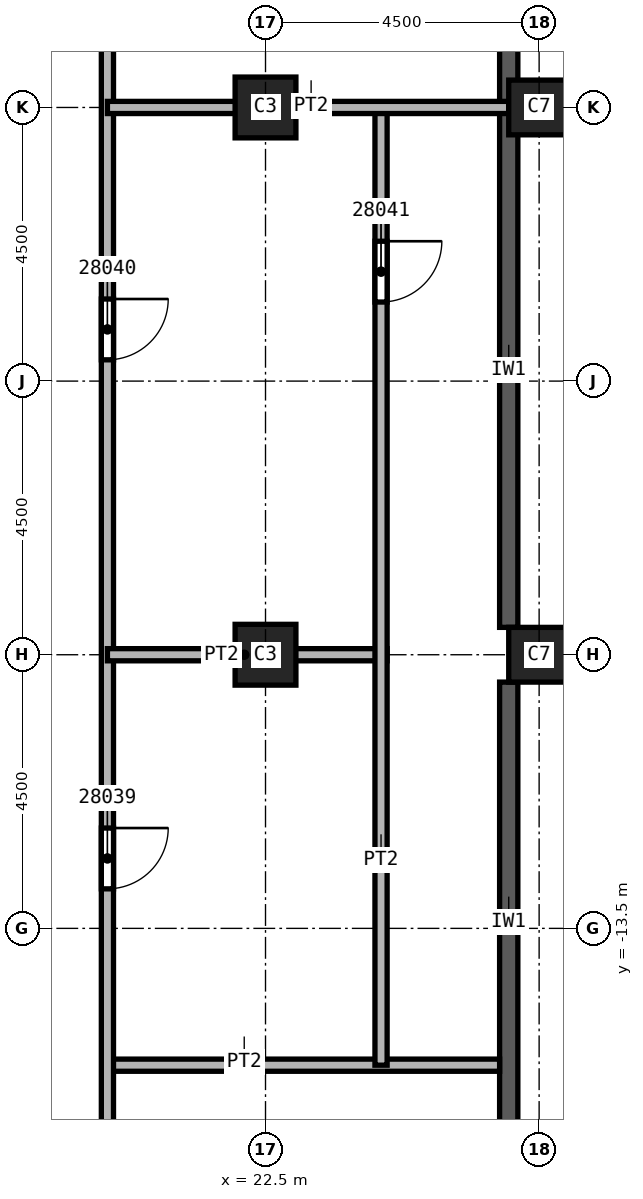
"""IFC4 building model, lengths in metres.
Left out: names, types, materials, properties, quantities, classifications, styles, units other than length and angle.
Written with IfcOpenShell. Run it as: python <this file> out.ifc"""

import sys

from ifc_helpers import new_model, si_unit, direction, frame, frame_2d, origin, origin_2d, place, context, subcontext, project, spatial, rectangle, extrude, element, fill, save


model = new_model("IFC4")
c1 = context("Model", 3, precision=1e-05, world=origin(), true_north=direction((0.0, 1.0)))
c2 = subcontext(c1, "Body", "Model", "MODEL_VIEW")
j1 = project(units=[si_unit("LENGTHUNIT", "METRE"), si_unit("PLANEANGLEUNIT", "RADIAN")], contexts=[c1])
p1 = place(None, origin())
s1 = spatial("IfcSite", under=j1, at=p1, CompositionType="ELEMENT")
p2 = place(p1, origin())
s2 = spatial("IfcBuilding", under=s1, at=p2, CompositionType="ELEMENT")
p3 = place(p2, frame((0.0, 0.0, 236.0)))
s3 = spatial("IfcBuildingStorey", under=s2, at=p3, CompositionType="ELEMENT", Elevation=236.0)
for number, where, z_axis, x_axis in (
    (1, (22.5, 0.0, 0.0), (0.0, 0.0, 1.0), (1.0, 0.0, 0.0)),
    (2, (22.5, -9.0, 0.0), (0.0, 0.0, 1.0), (1.0, 0.0, 0.0)),
):
    element("IfcColumn", number, at=place(p3, frame(where, z_axis=z_axis, x_axis=x_axis)), inside=s3, PredefinedType="COLUMN", context=c2, shape_type="SweptSolid", body=[
        extrude(rectangle(XDim=1.0, YDim=1.0, at=origin_2d()), origin(), (0.0, 0.0, 1.0), 5.72),
    ])
for number, where, z_axis, x_axis in (
    (3, (27.0, 0.0, 0.0), (0.0, 0.0, 1.0), (0.0, 1.0, 0.0)),
    (4, (27.0, -9.0, 0.0), (0.0, 0.0, 1.0), (0.0, 1.0, 0.0)),
):
    element("IfcColumn", number, at=place(p3, frame(where, z_axis=z_axis, x_axis=x_axis)), inside=s3, PredefinedType="COLUMN", context=c2, shape_type="SweptSolid", body=[
        extrude(rectangle(XDim=0.9, YDim=1.0, at=origin_2d()), origin(), (0.0, 0.0, 1.0), 5.72),
    ])
p4 = place(p3, frame((26.5, -17.61, 0.0), z_axis=(0.0, 0.0, 1.0), x_axis=(0.0, 1.0, 0.0)))
e5 = element("IfcWall", 5, at=p4, inside=s3, PredefinedType="SOLIDWALL", context=c2, shape_type="SweptSolid", body=[
    extrude(rectangle(XDim=8.16, YDim=0.3, at=frame_2d((4.08, 0.0))), origin(), (0.0, 0.0, 1.0), 5.12),
])
p5 = place(p3, frame((26.5, -8.55, 0.0), z_axis=(0.0, 0.0, 1.0), x_axis=(0.0, 1.0, 0.0)))
e6 = element("IfcWall", 6, at=p5, inside=s3, PredefinedType="SOLIDWALL", context=c2, shape_type="SweptSolid", body=[
    extrude(rectangle(XDim=8.5, YDim=0.3, at=frame_2d((4.25, 0.0))), origin(), (0.0, 0.0, 1.0), 5.12),
])
p6 = place(p3, frame((26.5, 0.05, 0.0), z_axis=(0.0, 0.0, 1.0), x_axis=(0.0, 1.0, 0.0)))
e7 = element("IfcWall", 7, at=p6, inside=s3, PredefinedType="SOLIDWALL", context=c2, shape_type="SweptSolid", body=[
    extrude(rectangle(XDim=8.9, YDim=0.3, at=frame_2d((4.45, 0.0))), origin(), (0.0, 0.0, 1.0), 5.12),
])
p7 = place(p3, frame((19.9, -15.75, 0.0), z_axis=(0.0, 0.0, 1.0), x_axis=(1.0, 0.0, 0.0)))
e8 = element("IfcWall", 8, at=p7, inside=s3, PredefinedType="PARTITIONING", context=c2, shape_type="SweptSolid", body=[
    extrude(rectangle(XDim=6.45, YDim=0.2, at=frame_2d((3.225, 0.0))), origin(), (0.0, 0.0, 1.0), 5.72),
])
p8 = place(p3, frame((19.9, 22.15, 0.0), z_axis=(0.0, 0.0, 1.0), x_axis=(0.0, -1.0, 0.0)))
e9 = element("IfcWall", 9, at=p8, inside=s3, PredefinedType="PARTITIONING", context=c2, shape_type="SweptSolid", body=[
    extrude(rectangle(XDim=44.3, YDim=0.2, at=frame_2d((22.15, 0.0))), origin(), (0.0, 0.0, 1.0), 5.72),
])
p9 = place(p8, frame((14.5, 0.0, 0.0)))
e10 = element("IfcOpeningElement", 10, at=p9, cuts=e9, PredefinedType="OPENING", context=c2, shape_type="SweptSolid", body=[
    extrude(rectangle(XDim=1.0, YDim=2.1, at=frame_2d((0.5, 1.05))), frame((0.0, 0.1, 0.0), z_axis=(0.0, -1.0, 0.0), x_axis=(1.0, 0.0, 0.0)), (0.0, 0.0, 1.0), 0.2),
])
p10 = place(p8, frame((11.95, 0.0, 0.0)))
e11 = element("IfcOpeningElement", 11, at=p10, cuts=e9, PredefinedType="OPENING", context=c2, shape_type="SweptSolid", body=[
    extrude(rectangle(XDim=1.0, YDim=2.1, at=frame_2d((0.5, 1.05))), frame((0.0, 0.1, 0.0), z_axis=(0.0, -1.0, 0.0), x_axis=(1.0, 0.0, 0.0)), (0.0, 0.0, 1.0), 0.2),
])
p11 = place(p8, frame((4.6, 0.0, 0.0)))
e12 = element("IfcOpeningElement", 12, at=p11, cuts=e9, PredefinedType="OPENING", context=c2, shape_type="SweptSolid", body=[
    extrude(rectangle(XDim=1.0, YDim=2.1, at=frame_2d((0.5, 1.05))), frame((0.0, 0.1, 0.0), z_axis=(0.0, -1.0, 0.0), x_axis=(1.0, 0.0, 0.0)), (0.0, 0.0, 1.0), 0.2),
])
p12 = place(p8, frame((41.5, 0.0, 0.0)))
e13 = element("IfcOpeningElement", 13, at=p12, cuts=e9, PredefinedType="OPENING", context=c2, shape_type="SweptSolid", body=[
    extrude(rectangle(XDim=1.0, YDim=2.1, at=frame_2d((0.5, 1.05))), frame((0.0, 0.1, 0.0), z_axis=(0.0, -1.0, 0.0), x_axis=(1.0, 0.0, 0.0)), (0.0, 0.0, 1.0), 0.2),
])
p13 = place(p8, frame((34.0, 0.0, 0.0)))
e14 = element("IfcOpeningElement", 14, at=p13, cuts=e9, PredefinedType="OPENING", context=c2, shape_type="SweptSolid", body=[
    extrude(rectangle(XDim=1.0, YDim=2.1, at=frame_2d((0.5, 1.05))), frame((0.0, 0.1, 0.0), z_axis=(0.0, -1.0, 0.0), x_axis=(1.0, 0.0, 0.0)), (0.0, 0.0, 1.0), 0.2),
])
p14 = place(p8, frame((25.3, 0.0, 0.0)))
e15 = element("IfcOpeningElement", 15, at=p14, cuts=e9, PredefinedType="OPENING", context=c2, shape_type="SweptSolid", body=[
    extrude(rectangle(XDim=1.0, YDim=2.1, at=frame_2d((0.5, 1.05))), frame((0.0, 0.1, 0.0), z_axis=(0.0, -1.0, 0.0), x_axis=(1.0, 0.0, 0.0)), (0.0, 0.0, 1.0), 0.2),
])
p15 = place(p3, frame((19.9, -9.0, 0.0), z_axis=(0.0, 0.0, 1.0), x_axis=(1.0, 0.0, 0.0)))
e16 = element("IfcWall", 16, at=p15, inside=s3, PredefinedType="PARTITIONING", context=c2, shape_type="SweptSolid", body=[
    extrude(rectangle(XDim=4.6, YDim=0.2, at=frame_2d((2.3, 0.0))), origin(), (0.0, 0.0, 1.0), 5.72),
])
p16 = place(p3, frame((24.4, 0.0, 0.0), z_axis=(0.0, 0.0, 1.0), x_axis=(0.0, -1.0, 0.0)))
e17 = element("IfcWall", 17, at=p16, inside=s3, PredefinedType="PARTITIONING", context=c2, shape_type="SweptSolid", body=[
    extrude(rectangle(XDim=15.75, YDim=0.2, at=frame_2d((7.875, 0.0))), origin(), (0.0, 0.0, 1.0), 5.72),
])
p17 = place(p16, frame((2.2, 0.0, 0.0)))
e18 = element("IfcOpeningElement", 18, at=p17, cuts=e17, PredefinedType="OPENING", context=c2, shape_type="SweptSolid", body=[
    extrude(rectangle(XDim=1.0, YDim=2.1, at=frame_2d((0.5, 1.05))), frame((0.0, 0.1, 0.0), z_axis=(0.0, -1.0, 0.0), x_axis=(1.0, 0.0, 0.0)), (0.0, 0.0, 1.0), 0.2),
])
p18 = place(p3, frame((26.5, 0.0, 0.0), z_axis=(0.0, 0.0, 1.0), x_axis=(-1.0, 0.0, 0.0)))
e19 = element("IfcWall", 19, at=p18, inside=s3, PredefinedType="PARTITIONING", context=c2, shape_type="SweptSolid", body=[
    extrude(rectangle(XDim=6.6, YDim=0.2, at=frame_2d((3.3, 0.0))), origin(), (0.0, 0.0, 1.0), 5.72),
])
p19 = place(p13, origin())
e20 = element("IfcDoor", 20, at=p19, inside=s3, OperationType="SINGLE_SWING_RIGHT", PredefinedType="DOOR", context=c2, shape_type="SweptSolid", body=[
    extrude(rectangle(XDim=1.0, YDim=2.1, at=frame_2d((0.5, 1.05))), frame((0.0, 0.025, 0.0), z_axis=(0.0, -1.0, 0.0), x_axis=(1.0, 0.0, 0.0)), (0.0, 0.0, 1.0), 0.05),
])
fill(e14, e20)
p20 = place(p14, origin())
e21 = element("IfcDoor", 21, at=p20, inside=s3, OperationType="SINGLE_SWING_LEFT", PredefinedType="DOOR", context=c2, shape_type="SweptSolid", body=[
    extrude(rectangle(XDim=1.0, YDim=2.1, at=frame_2d((0.5, 1.05))), frame((0.0, 0.025, 0.0), z_axis=(0.0, -1.0, 0.0), x_axis=(1.0, 0.0, 0.0)), (0.0, 0.0, 1.0), 0.05),
])
fill(e15, e21)
p21 = place(p17, origin())
e22 = element("IfcDoor", 22, at=p21, inside=s3, OperationType="SINGLE_SWING_RIGHT", PredefinedType="DOOR", context=c2, shape_type="SweptSolid", body=[
    extrude(rectangle(XDim=1.0, YDim=2.1, at=frame_2d((0.5, 1.05))), frame((0.0, 0.025, 0.0), z_axis=(0.0, -1.0, 0.0), x_axis=(1.0, 0.0, 0.0)), (0.0, 0.0, 1.0), 0.05),
])
fill(e18, e22)
save(model, sys.argv[1])
